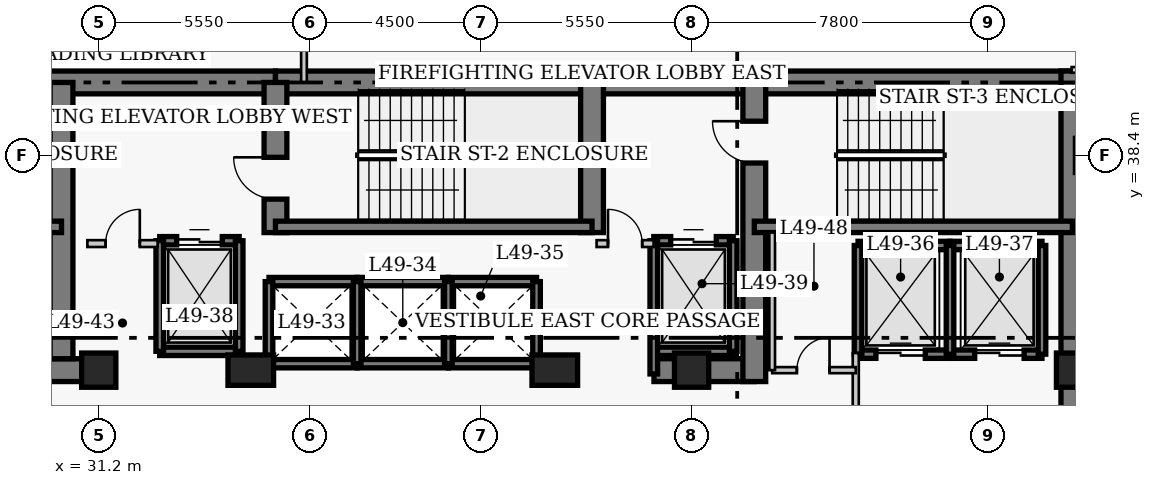
"""IFC4 building model, lengths in metres.
Left out: names, types, materials, properties, quantities, classifications, styles, units other than length and angle.
Written with IfcOpenShell. Run it as: python <this file> out.ifc"""

import sys

from ifc_helpers import new_model, si_unit, direction, frame, frame_2d, origin, origin_2d, place, context, subcontext, project, spatial, rectangle, extrude, element, fill, save


model = new_model("IFC4")
c1 = context("Model", 3, precision=1e-05, world=origin(), true_north=direction((0.0, 1.0)))
c2 = subcontext(c1, "Body", "Model", "MODEL_VIEW")
j1 = project(units=[si_unit("LENGTHUNIT", "METRE"), si_unit("PLANEANGLEUNIT", "RADIAN")], contexts=[c1])
p1 = place(None, origin())
s1 = spatial("IfcSite", under=j1, at=p1, CompositionType="ELEMENT")
p2 = place(p1, origin())
s2 = spatial("IfcBuilding", under=s1, at=p2, CompositionType="ELEMENT")
p3 = place(p2, frame((0.0, 0.0, 196.8)))
s3 = spatial("IfcBuildingStorey", under=s2, at=p3, CompositionType="ELEMENT", Elevation=196.8)
p4 = place(p3, frame((21.6, 40.32, 0.0), z_axis=(0.0, 0.0, 1.0), x_axis=(1.0, 0.0, 0.0)))
e1 = element("IfcWall", 1, at=p4, inside=s3, PredefinedType="SHEAR", context=c2, shape_type="SweptSolid", body=[
    extrude(rectangle(XDim=14.25, YDim=0.6, at=frame_2d((7.125, 0.0))), origin(), (0.0, 0.0, 1.0), 3.9),
])
p5 = place(p3, frame((35.85, 40.32, 0.0), z_axis=(0.0, 0.0, 1.0), x_axis=(1.0, 0.0, 0.0)))
e2 = element("IfcWall", 2, at=p5, inside=s3, PredefinedType="SHEAR", context=c2, shape_type="SweptSolid", body=[
    extrude(rectangle(XDim=12.6, YDim=0.6, at=frame_2d((6.3, 0.0))), origin(), (0.0, 0.0, 1.0), 3.9),
])
p6 = place(p3, frame((48.45, 40.32, 0.0), z_axis=(0.0, 0.0, 1.0), x_axis=(1.0, 0.0, 0.0)))
e3 = element("IfcWall", 3, at=p6, inside=s3, PredefinedType="SHEAR", context=c2, shape_type="SweptSolid", body=[
    extrude(rectangle(XDim=8.67, YDim=0.6, at=frame_2d((4.335, 0.0))), origin(), (0.0, 0.0, 1.0), 3.9),
])
p7 = place(p3, frame((56.82, 27.05, 0.0), z_axis=(0.0, 0.0, 1.0), x_axis=(0.0, 1.0, 0.0)))
e4 = element("IfcWall", 4, at=p7, inside=s3, PredefinedType="SHEAR", context=c2, shape_type="SweptSolid", body=[
    extrude(rectangle(XDim=13.57, YDim=0.6, at=frame_2d((6.785, 0.0))), origin(), (0.0, 0.0, 1.0), 3.9),
])
p8 = place(p3, frame((28.45, 32.75, 0.0), z_axis=(0.0, 0.0, 1.0), x_axis=(1.0, 0.0, 0.0)))
e5 = element("IfcWall", 5, at=p8, inside=s3, PredefinedType="SHEAR", context=c2, shape_type="SweptSolid", body=[
    extrude(rectangle(XDim=2.4, YDim=0.6, at=frame_2d((1.2, 0.0))), origin(), (0.0, 0.0, 1.0), 3.9),
])
p9 = place(p3, frame((45.81, 32.75, 0.0), z_axis=(0.0, 0.0, 1.0), x_axis=(1.0, 0.0, 0.0)))
e6 = element("IfcWall", 6, at=p9, inside=s3, PredefinedType="SHEAR", context=c2, shape_type="SweptSolid", body=[
    extrude(rectangle(XDim=2.64, YDim=0.6, at=frame_2d((1.32, 0.0))), origin(), (0.0, 0.0, 1.0), 3.9),
])
p10 = place(p3, frame((30.22, 33.05, 0.0), z_axis=(0.0, 0.0, 1.0), x_axis=(0.0, 1.0, 0.0)))
e7 = element("IfcWall", 7, at=p10, inside=s3, PredefinedType="SHEAR", context=c2, shape_type="SweptSolid", body=[
    extrude(rectangle(XDim=7.27, YDim=0.6, at=frame_2d((3.635, 0.0))), origin(), (0.0, 0.0, 1.0), 3.9),
])
p11 = place(p3, frame((35.85, 36.37, 0.0), z_axis=(0.0, 0.0, 1.0), x_axis=(0.0, 1.0, 0.0)))
e8 = element("IfcWall", 8, at=p11, inside=s3, PredefinedType="SHEAR", context=c2, shape_type="SweptSolid", body=[
    extrude(rectangle(XDim=3.95, YDim=0.6, at=frame_2d((1.975, 0.0))), origin(), (0.0, 0.0, 1.0), 3.9),
])
p12 = place(p11, frame((0.88, 0.0, 0.0)))
e9 = element("IfcOpeningElement", 9, at=p12, cuts=e8, PredefinedType="OPENING", context=c2, shape_type="SweptSolid", body=[
    extrude(rectangle(XDim=1.1, YDim=2.15, at=frame_2d((0.55, 1.075))), frame((0.0, 0.31, 0.0), z_axis=(0.0, -1.0, 0.0), x_axis=(1.0, 0.0, 0.0)), (0.0, 0.0, 1.0), 0.62),
])
p13 = place(p3, frame((44.18, 36.37, 0.0), z_axis=(0.0, 0.0, 1.0), x_axis=(0.0, 1.0, 0.0)))
e10 = element("IfcWall", 10, at=p13, inside=s3, PredefinedType="SHEAR", context=c2, shape_type="SweptSolid", body=[
    extrude(rectangle(XDim=3.95, YDim=0.6, at=frame_2d((1.975, 0.0))), origin(), (0.0, 0.0, 1.0), 3.9),
])
p14 = place(p3, frame((48.45, 32.45, 0.0), z_axis=(0.0, 0.0, 1.0), x_axis=(0.0, 1.0, 0.0)))
e11 = element("IfcWall", 11, at=p14, inside=s3, PredefinedType="SHEAR", context=c2, shape_type="SweptSolid", body=[
    extrude(rectangle(XDim=7.87, YDim=0.6, at=frame_2d((3.935, 0.0))), origin(), (0.0, 0.0, 1.0), 3.9),
])
p15 = place(p14, frame((5.75, 0.0, 0.0)))
e12 = element("IfcOpeningElement", 12, at=p15, cuts=e11, PredefinedType="OPENING", context=c2, shape_type="SweptSolid", body=[
    extrude(rectangle(XDim=1.1, YDim=2.15, at=frame_2d((0.55, 1.075))), frame((0.0, 0.31, 0.0), z_axis=(0.0, -1.0, 0.0), x_axis=(1.0, 0.0, 0.0)), (0.0, 0.0, 1.0), 0.62),
])
p16 = place(p3, frame((21.9, 36.52, 0.0), z_axis=(0.0, 0.0, 1.0), x_axis=(1.0, 0.0, 0.0)))
e13 = element("IfcWall", 13, at=p16, inside=s3, PredefinedType="SHEAR", context=c2, shape_type="SweptSolid", body=[
    extrude(rectangle(XDim=8.32, YDim=0.3, at=frame_2d((4.16, 0.0))), origin(), (0.0, 0.0, 1.0), 3.9),
])
p17 = place(p16, frame((0.9, 0.0, 0.0)))
e14 = element("IfcOpeningElement", 14, at=p17, cuts=e13, PredefinedType="OPENING", context=c2, shape_type="SweptSolid", body=[
    extrude(rectangle(XDim=1.1, YDim=2.15, at=frame_2d((0.55, 1.075))), frame((0.0, 0.16, 0.0), z_axis=(0.0, -1.0, 0.0), x_axis=(1.0, 0.0, 0.0)), (0.0, 0.0, 1.0), 0.32),
])
p18 = place(p3, frame((35.85, 36.52, 0.0), z_axis=(0.0, 0.0, 1.0), x_axis=(1.0, 0.0, 0.0)))
e15 = element("IfcWall", 15, at=p18, inside=s3, PredefinedType="SHEAR", context=c2, shape_type="SweptSolid", body=[
    extrude(rectangle(XDim=8.33, YDim=0.3, at=frame_2d((4.165, 0.0))), origin(), (0.0, 0.0, 1.0), 3.9),
])
p19 = place(p3, frame((48.45, 36.52, 0.0), z_axis=(0.0, 0.0, 1.0), x_axis=(1.0, 0.0, 0.0)))
e16 = element("IfcWall", 16, at=p19, inside=s3, PredefinedType="SHEAR", context=c2, shape_type="SweptSolid", body=[
    extrude(rectangle(XDim=8.37, YDim=0.3, at=frame_2d((4.185, 0.0))), origin(), (0.0, 0.0, 1.0), 3.9),
])
p20 = place(p3, frame((31.2, 32.75, 0.0), z_axis=(0.0, 0.0, 1.0), x_axis=(1.0, 0.0, 0.0)))
e17 = element("IfcColumn", 17, at=p20, inside=s3, PredefinedType="COLUMN", context=c2, shape_type="SweptSolid", body=[
    extrude(rectangle(XDim=0.9, YDim=0.9, at=origin_2d()), origin(), (0.0, 0.0, 1.0), 3.9),
])
for number, where, z_axis, x_axis in (
    (18, (35.2, 32.75, 0.0), (0.0, 0.0, 1.0), (1.0, 0.0, 0.0)),
    (19, (43.2, 32.75, 0.0), (0.0, 0.0, 1.0), (1.0, 0.0, 0.0)),
):
    element("IfcColumn", number, at=place(p3, frame(where, z_axis=z_axis, x_axis=x_axis)), inside=s3, PredefinedType="COLUMN", context=c2, shape_type="SweptSolid", body=[
        extrude(rectangle(XDim=1.2, YDim=0.8, at=origin_2d()), origin(), (0.0, 0.0, 1.0), 3.9),
    ])
for number, where, z_axis, x_axis in (
    (20, (46.8, 32.75, 0.0), (0.0, 0.0, 1.0), (1.0, 0.0, 0.0)),
    (21, (56.85, 32.75, 0.0), (0.0, 0.0, 1.0), (1.0, 0.0, 0.0)),
):
    element("IfcColumn", number, at=place(p3, frame(where, z_axis=z_axis, x_axis=x_axis)), inside=s3, PredefinedType="COLUMN", context=c2, shape_type="SweptSolid", body=[
        extrude(rectangle(XDim=0.9, YDim=0.9, at=origin_2d()), origin(), (0.0, 0.0, 1.0), 3.9),
    ])
for number, where, z_axis, x_axis in (
    (22, (35.68, 35.08, 0.0), (0.0, 0.0, 1.0), (1.0, 0.0, 0.0)),
    (23, (35.68, 32.92, 0.0), (0.0, 0.0, 1.0), (1.0, 0.0, 0.0)),
):
    element("IfcWall", number, at=place(p3, frame(where, z_axis=z_axis, x_axis=x_axis)), inside=s3, PredefinedType="SHEAR", context=c2, shape_type="SweptSolid", body=[
        extrude(rectangle(XDim=2.32, YDim=0.22, at=frame_2d((1.16, 0.0))), origin(), (0.0, 0.0, 1.0), 3.9),
    ])
p21 = place(p3, frame((35.68, 32.92, 0.0), z_axis=(0.0, 0.0, 1.0), x_axis=(0.0, 1.0, 0.0)))
e24 = element("IfcWall", 24, at=p21, inside=s3, PredefinedType="SHEAR", context=c2, shape_type="SweptSolid", body=[
    extrude(rectangle(XDim=2.16, YDim=0.2, at=frame_2d((1.08, 0.0))), origin(), (0.0, 0.0, 1.0), 3.9),
])
for number, where, z_axis, x_axis in (
    (25, (38.0, 35.08, 0.0), (0.0, 0.0, 1.0), (1.0, 0.0, 0.0)),
    (26, (38.0, 32.92, 0.0), (0.0, 0.0, 1.0), (1.0, 0.0, 0.0)),
):
    element("IfcWall", number, at=place(p3, frame(where, z_axis=z_axis, x_axis=x_axis)), inside=s3, PredefinedType="SHEAR", context=c2, shape_type="SweptSolid", body=[
        extrude(rectangle(XDim=2.4, YDim=0.22, at=frame_2d((1.2, 0.0))), origin(), (0.0, 0.0, 1.0), 3.9),
    ])
p22 = place(p3, frame((38.0, 32.92, 0.0), z_axis=(0.0, 0.0, 1.0), x_axis=(0.0, 1.0, 0.0)))
e27 = element("IfcWall", 27, at=p22, inside=s3, PredefinedType="SHEAR", context=c2, shape_type="SweptSolid", body=[
    extrude(rectangle(XDim=2.16, YDim=0.2, at=frame_2d((1.08, 0.0))), origin(), (0.0, 0.0, 1.0), 3.9),
])
for number, where, z_axis, x_axis in (
    (28, (40.4, 35.08, 0.0), (0.0, 0.0, 1.0), (1.0, 0.0, 0.0)),
    (29, (40.4, 32.92, 0.0), (0.0, 0.0, 1.0), (1.0, 0.0, 0.0)),
):
    element("IfcWall", number, at=place(p3, frame(where, z_axis=z_axis, x_axis=x_axis)), inside=s3, PredefinedType="SHEAR", context=c2, shape_type="SweptSolid", body=[
        extrude(rectangle(XDim=2.32, YDim=0.22, at=frame_2d((1.16, 0.0))), origin(), (0.0, 0.0, 1.0), 3.9),
    ])
for number, where, z_axis, x_axis in (
    (30, (40.4, 32.92, 0.0), (0.0, 0.0, 1.0), (0.0, 1.0, 0.0)),
    (31, (42.72, 32.92, 0.0), (0.0, 0.0, 1.0), (0.0, 1.0, 0.0)),
):
    element("IfcWall", number, at=place(p3, frame(where, z_axis=z_axis, x_axis=x_axis)), inside=s3, PredefinedType="SHEAR", context=c2, shape_type="SweptSolid", body=[
        extrude(rectangle(XDim=2.16, YDim=0.2, at=frame_2d((1.08, 0.0))), origin(), (0.0, 0.0, 1.0), 3.9),
    ])
p23 = place(p3, frame((51.18, 36.03, 0.0), z_axis=(0.0, 0.0, 1.0), x_axis=(1.0, 0.0, 0.0)))
e32 = element("IfcWall", 32, at=p23, inside=s3, PredefinedType="SHEAR", context=c2, shape_type="SweptSolid", body=[
    extrude(rectangle(XDim=2.42, YDim=0.22, at=frame_2d((1.21, 0.0))), origin(), (0.0, 0.0, 1.0), 3.9),
])
p24 = place(p3, frame((51.18, 33.17, 0.0), z_axis=(0.0, 0.0, 1.0), x_axis=(1.0, 0.0, 0.0)))
e33 = element("IfcWall", 33, at=p24, inside=s3, PredefinedType="SHEAR", context=c2, shape_type="SweptSolid", body=[
    extrude(rectangle(XDim=2.42, YDim=0.22, at=frame_2d((1.21, 0.0))), origin(), (0.0, 0.0, 1.0), 3.9),
])
p25 = place(p24, frame((0.47, 0.0, 0.0)))
e34 = element("IfcOpeningElement", 34, at=p25, cuts=e33, PredefinedType="OPENING", context=c2, shape_type="SweptSolid", body=[
    extrude(rectangle(XDim=1.3, YDim=2.15, at=frame_2d((0.65, 1.075))), frame((0.0, 0.12, 0.0), z_axis=(0.0, -1.0, 0.0), x_axis=(1.0, 0.0, 0.0)), (0.0, 0.0, 1.0), 0.24),
])
p26 = place(p3, frame((51.18, 33.17, 0.0), z_axis=(0.0, 0.0, 1.0), x_axis=(0.0, 1.0, 0.0)))
e35 = element("IfcWall", 35, at=p26, inside=s3, PredefinedType="SHEAR", context=c2, shape_type="SweptSolid", body=[
    extrude(rectangle(XDim=2.86, YDim=0.2, at=frame_2d((1.43, 0.0))), origin(), (0.0, 0.0, 1.0), 3.9),
])
p27 = place(p3, frame((53.6, 36.03, 0.0), z_axis=(0.0, 0.0, 1.0), x_axis=(1.0, 0.0, 0.0)))
e36 = element("IfcWall", 36, at=p27, inside=s3, PredefinedType="SHEAR", context=c2, shape_type="SweptSolid", body=[
    extrude(rectangle(XDim=2.42, YDim=0.22, at=frame_2d((1.21, 0.0))), origin(), (0.0, 0.0, 1.0), 3.9),
])
p28 = place(p3, frame((53.6, 33.17, 0.0), z_axis=(0.0, 0.0, 1.0), x_axis=(1.0, 0.0, 0.0)))
e37 = element("IfcWall", 37, at=p28, inside=s3, PredefinedType="SHEAR", context=c2, shape_type="SweptSolid", body=[
    extrude(rectangle(XDim=2.42, YDim=0.22, at=frame_2d((1.21, 0.0))), origin(), (0.0, 0.0, 1.0), 3.9),
])
p29 = place(p28, frame((0.65, 0.0, 0.0)))
e38 = element("IfcOpeningElement", 38, at=p29, cuts=e37, PredefinedType="OPENING", context=c2, shape_type="SweptSolid", body=[
    extrude(rectangle(XDim=1.3, YDim=2.15, at=frame_2d((0.65, 1.075))), frame((0.0, 0.12, 0.0), z_axis=(0.0, -1.0, 0.0), x_axis=(1.0, 0.0, 0.0)), (0.0, 0.0, 1.0), 0.24),
])
for number, where, z_axis, x_axis in (
    (39, (53.6, 33.17, 0.0), (0.0, 0.0, 1.0), (0.0, 1.0, 0.0)),
    (40, (56.02, 33.17, 0.0), (0.0, 0.0, 1.0), (0.0, 1.0, 0.0)),
):
    element("IfcWall", number, at=place(p3, frame(where, z_axis=z_axis, x_axis=x_axis)), inside=s3, PredefinedType="SHEAR", context=c2, shape_type="SweptSolid", body=[
        extrude(rectangle(XDim=2.86, YDim=0.2, at=frame_2d((1.43, 0.0))), origin(), (0.0, 0.0, 1.0), 3.9),
    ])
p30 = place(p3, frame((32.805, 36.155, 0.0), z_axis=(0.0, 0.0, 1.0), x_axis=(1.0, 0.0, 0.0)))
e41 = element("IfcWall", 41, at=p30, inside=s3, PredefinedType="SHEAR", context=c2, shape_type="SweptSolid", body=[
    extrude(rectangle(XDim=2.09, YDim=0.22, at=frame_2d((1.045, 0.0))), origin(), (0.0, 0.0, 1.0), 3.9),
])
p31 = place(p30, frame((0.445, 0.0, 0.0)))
e42 = element("IfcOpeningElement", 42, at=p31, cuts=e41, PredefinedType="OPENING", context=c2, shape_type="SweptSolid", body=[
    extrude(rectangle(XDim=1.2, YDim=2.15, at=frame_2d((0.6, 1.075))), frame((0.0, 0.12, 0.0), z_axis=(0.0, -1.0, 0.0), x_axis=(1.0, 0.0, 0.0)), (0.0, 0.0, 1.0), 0.24),
])
p32 = place(p3, frame((32.805, 33.245, 0.0), z_axis=(0.0, 0.0, 1.0), x_axis=(1.0, 0.0, 0.0)))
e43 = element("IfcWall", 43, at=p32, inside=s3, PredefinedType="SHEAR", context=c2, shape_type="SweptSolid", body=[
    extrude(rectangle(XDim=2.09, YDim=0.22, at=frame_2d((1.045, 0.0))), origin(), (0.0, 0.0, 1.0), 3.9),
])
for number, where, z_axis, x_axis in (
    (44, (32.805, 33.245, 0.0), (0.0, 0.0, 1.0), (0.0, 1.0, 0.0)),
    (45, (34.895, 33.245, 0.0), (0.0, 0.0, 1.0), (0.0, 1.0, 0.0)),
):
    element("IfcWall", number, at=place(p3, frame(where, z_axis=z_axis, x_axis=x_axis)), inside=s3, PredefinedType="SHEAR", context=c2, shape_type="SweptSolid", body=[
        extrude(rectangle(XDim=2.91, YDim=0.2, at=frame_2d((1.455, 0.0))), origin(), (0.0, 0.0, 1.0), 3.9),
    ])
p33 = place(p3, frame((45.805, 36.155, 0.0), z_axis=(0.0, 0.0, 1.0), x_axis=(1.0, 0.0, 0.0)))
e46 = element("IfcWall", 46, at=p33, inside=s3, PredefinedType="SHEAR", context=c2, shape_type="SweptSolid", body=[
    extrude(rectangle(XDim=2.09, YDim=0.22, at=frame_2d((1.045, 0.0))), origin(), (0.0, 0.0, 1.0), 3.9),
])
p34 = place(p33, frame((0.445, 0.0, 0.0)))
e47 = element("IfcOpeningElement", 47, at=p34, cuts=e46, PredefinedType="OPENING", context=c2, shape_type="SweptSolid", body=[
    extrude(rectangle(XDim=1.2, YDim=2.15, at=frame_2d((0.6, 1.075))), frame((0.0, 0.12, 0.0), z_axis=(0.0, -1.0, 0.0), x_axis=(1.0, 0.0, 0.0)), (0.0, 0.0, 1.0), 0.24),
])
p35 = place(p3, frame((45.805, 33.245, 0.0), z_axis=(0.0, 0.0, 1.0), x_axis=(1.0, 0.0, 0.0)))
e48 = element("IfcWall", 48, at=p35, inside=s3, PredefinedType="SHEAR", context=c2, shape_type="SweptSolid", body=[
    extrude(rectangle(XDim=2.09, YDim=0.22, at=frame_2d((1.045, 0.0))), origin(), (0.0, 0.0, 1.0), 3.9),
])
p36 = place(p3, frame((45.805, 32.65, 0.0), z_axis=(0.0, 0.0, 1.0), x_axis=(0.0, 1.0, 0.0)))
e49 = element("IfcWall", 49, at=p36, inside=s3, PredefinedType="SHEAR", context=c2, shape_type="SweptSolid", body=[
    extrude(rectangle(XDim=3.505, YDim=0.2, at=frame_2d((1.752, 0.0))), origin(), (0.0, 0.0, 1.0), 3.9),
])
p37 = place(p3, frame((47.895, 33.245, 0.0), z_axis=(0.0, 0.0, 1.0), x_axis=(0.0, 1.0, 0.0)))
e50 = element("IfcWall", 50, at=p37, inside=s3, PredefinedType="SHEAR", context=c2, shape_type="SweptSolid", body=[
    extrude(rectangle(XDim=2.91, YDim=0.2, at=frame_2d((1.455, 0.0))), origin(), (0.0, 0.0, 1.0), 3.9),
])
p38 = place(p3, frame((30.9, 36.08, 0.0), z_axis=(0.0, 0.0, 1.0), x_axis=(1.0, 0.0, 0.0)))
e51 = element("IfcWall", 51, at=p38, inside=s3, PredefinedType="PARTITIONING", context=c2, shape_type="SweptSolid", body=[
    extrude(rectangle(XDim=1.85, YDim=0.18, at=frame_2d((0.925, 0.0))), origin(), (0.0, 0.0, 1.0), 3.65),
])
p39 = place(p38, frame((0.48, 0.0, 0.0)))
e52 = element("IfcOpeningElement", 52, at=p39, cuts=e51, PredefinedType="OPENING", context=c2, shape_type="SweptSolid", body=[
    extrude(rectangle(XDim=0.9, YDim=2.15, at=frame_2d((0.45, 1.075))), frame((0.0, 0.1, 0.0), z_axis=(0.0, -1.0, 0.0), x_axis=(1.0, 0.0, 0.0)), (0.0, 0.0, 1.0), 0.2),
])
p40 = place(p3, frame((44.3, 36.08, 0.0), z_axis=(0.0, 0.0, 1.0), x_axis=(1.0, 0.0, 0.0)))
e53 = element("IfcWall", 53, at=p40, inside=s3, PredefinedType="PARTITIONING", context=c2, shape_type="SweptSolid", body=[
    extrude(rectangle(XDim=1.5, YDim=0.18, at=frame_2d((0.75, 0.0))), origin(), (0.0, 0.0, 1.0), 3.65),
])
p41 = place(p40, frame((0.3, 0.0, 0.0)))
e54 = element("IfcOpeningElement", 54, at=p41, cuts=e53, PredefinedType="OPENING", context=c2, shape_type="SweptSolid", body=[
    extrude(rectangle(XDim=0.9, YDim=2.15, at=frame_2d((0.45, 1.075))), frame((0.0, 0.1, 0.0), z_axis=(0.0, -1.0, 0.0), x_axis=(1.0, 0.0, 0.0)), (0.0, 0.0, 1.0), 0.2),
])
p42 = place(p3, frame((51.12, 29.5, 0.0), z_axis=(0.0, 0.0, 1.0), x_axis=(0.0, 1.0, 0.0)))
e55 = element("IfcWall", 55, at=p42, inside=s3, PredefinedType="PARTITIONING", context=c2, shape_type="SweptSolid", body=[
    extrude(rectangle(XDim=3.7, YDim=0.16, at=frame_2d((1.85, 0.0))), origin(), (0.0, 0.0, 1.0), 3.65),
])
p43 = place(p42, frame((0.9, 0.0, 0.0)))
e56 = element("IfcOpeningElement", 56, at=p43, cuts=e55, PredefinedType="OPENING", context=c2, shape_type="SweptSolid", body=[
    extrude(rectangle(XDim=1.1, YDim=2.15, at=frame_2d((0.55, 1.075))), frame((0.0, 0.09, 0.0), z_axis=(0.0, -1.0, 0.0), x_axis=(1.0, 0.0, 0.0)), (0.0, 0.0, 1.0), 0.18),
])
p44 = place(p3, frame((48.92, 32.75, 0.0), z_axis=(0.0, 0.0, 1.0), x_axis=(1.0, 0.0, 0.0)))
e57 = element("IfcWall", 57, at=p44, inside=s3, PredefinedType="PARTITIONING", context=c2, shape_type="SweptSolid", body=[
    extrude(rectangle(XDim=2.2, YDim=0.16, at=frame_2d((1.1, 0.0))), origin(), (0.0, 0.0, 1.0), 3.65),
])
p45 = place(p44, frame((0.65, 0.0, 0.0)))
e58 = element("IfcOpeningElement", 58, at=p45, cuts=e57, PredefinedType="OPENING", context=c2, shape_type="SweptSolid", body=[
    extrude(rectangle(XDim=0.86, YDim=2.05, at=frame_2d((0.43, 1.025))), frame((0.0, 0.09, 0.0), z_axis=(0.0, -1.0, 0.0), x_axis=(1.0, 0.0, 0.0)), (0.0, 0.0, 1.0), 0.18),
])
p46 = place(p3, frame((48.92, 32.75, 0.0), z_axis=(0.0, 0.0, 1.0), x_axis=(0.0, 1.0, 0.0)))
e59 = element("IfcWall", 59, at=p46, inside=s3, PredefinedType="PARTITIONING", context=c2, shape_type="SweptSolid", body=[
    extrude(rectangle(XDim=3.62, YDim=0.15, at=frame_2d((1.81, 0.0))), origin(), (0.0, 0.0, 1.0), 3.65),
])
p47 = place(p3, frame((56.8, 40.65, 0.0), z_axis=(0.0, 0.0, 1.0), x_axis=(1.0, 0.0, 0.0)))
e60 = element("IfcWall", 60, at=p47, inside=s3, PredefinedType="PARTITIONING", context=c2, shape_type="SweptSolid", body=[
    extrude(rectangle(XDim=4.56, YDim=0.15, at=frame_2d((2.28, 0.0))), origin(), (0.0, 0.0, 1.0), 3.65),
])
p48 = place(p47, frame((2.95, 0.0, 0.0)))
e61 = element("IfcOpeningElement", 61, at=p48, cuts=e60, PredefinedType="OPENING", context=c2, shape_type="SweptSolid", body=[
    extrude(rectangle(XDim=1.0, YDim=2.15, at=frame_2d((0.5, 1.075))), frame((0.0, 0.085, 0.0), z_axis=(0.0, -1.0, 0.0), x_axis=(1.0, 0.0, 0.0)), (0.0, 0.0, 1.0), 0.17),
])
p49 = place(p3, frame((36.6, 40.32, 0.0), z_axis=(0.0, 0.0, 1.0), x_axis=(0.0, 1.0, 0.0)))
e62 = element("IfcWall", 62, at=p49, inside=s3, PredefinedType="PARTITIONING", context=c2, shape_type="SweptSolid", body=[
    extrude(rectangle(XDim=2.345, YDim=0.15, at=frame_2d((1.172, 0.0))), origin(), (0.0, 0.0, 1.0), 3.65),
])
p50 = place(p25, origin())
e63 = element("IfcDoor", 63, at=p50, inside=s3, OperationType="DOUBLE_DOOR_SLIDING", PredefinedType="DOOR", context=c2, shape_type="SweptSolid", body=[
    extrude(rectangle(XDim=1.3, YDim=2.15, at=frame_2d((0.65, 1.075))), frame((0.0, 0.025, 0.0), z_axis=(0.0, -1.0, 0.0), x_axis=(1.0, 0.0, 0.0)), (0.0, 0.0, 1.0), 0.05),
])
fill(e34, e63)
p51 = place(p29, origin())
e64 = element("IfcDoor", 64, at=p51, inside=s3, OperationType="DOUBLE_DOOR_SLIDING", PredefinedType="DOOR", context=c2, shape_type="SweptSolid", body=[
    extrude(rectangle(XDim=1.3, YDim=2.15, at=frame_2d((0.65, 1.075))), frame((0.0, 0.025, 0.0), z_axis=(0.0, -1.0, 0.0), x_axis=(1.0, 0.0, 0.0)), (0.0, 0.0, 1.0), 0.05),
])
fill(e38, e64)
p52 = place(p31, origin())
e65 = element("IfcDoor", 65, at=p52, inside=s3, OperationType="DOUBLE_DOOR_SLIDING", PredefinedType="DOOR", context=c2, shape_type="SweptSolid", body=[
    extrude(rectangle(XDim=1.2, YDim=2.15, at=frame_2d((0.6, 1.075))), frame((0.0, 0.025, 0.0), z_axis=(0.0, -1.0, 0.0), x_axis=(1.0, 0.0, 0.0)), (0.0, 0.0, 1.0), 0.05),
])
fill(e42, e65)
p53 = place(p34, origin())
e66 = element("IfcDoor", 66, at=p53, inside=s3, OperationType="DOUBLE_DOOR_SLIDING", PredefinedType="DOOR", context=c2, shape_type="SweptSolid", body=[
    extrude(rectangle(XDim=1.2, YDim=2.15, at=frame_2d((0.6, 1.075))), frame((0.0, 0.025, 0.0), z_axis=(0.0, -1.0, 0.0), x_axis=(1.0, 0.0, 0.0)), (0.0, 0.0, 1.0), 0.05),
])
fill(e47, e66)
p54 = place(p39, origin())
e67 = element("IfcDoor", 67, at=p54, inside=s3, OperationType="SINGLE_SWING_RIGHT", PredefinedType="DOOR", context=c2, shape_type="SweptSolid", body=[
    extrude(rectangle(XDim=0.9, YDim=2.15, at=frame_2d((0.45, 1.075))), frame((0.0, 0.025, 0.0), z_axis=(0.0, -1.0, 0.0), x_axis=(1.0, 0.0, 0.0)), (0.0, 0.0, 1.0), 0.05),
])
fill(e52, e67)
p55 = place(p41, origin())
e68 = element("IfcDoor", 68, at=p55, inside=s3, OperationType="SINGLE_SWING_LEFT", PredefinedType="DOOR", context=c2, shape_type="SweptSolid", body=[
    extrude(rectangle(XDim=0.9, YDim=2.15, at=frame_2d((0.45, 1.075))), frame((0.0, 0.025, 0.0), z_axis=(0.0, -1.0, 0.0), x_axis=(1.0, 0.0, 0.0)), (0.0, 0.0, 1.0), 0.05),
])
fill(e54, e68)
p56 = place(p45, origin())
e69 = element("IfcDoor", 69, at=p56, inside=s3, OperationType="SINGLE_SWING_RIGHT", PredefinedType="DOOR", context=c2, shape_type="SweptSolid", body=[
    extrude(rectangle(XDim=0.86, YDim=2.05, at=frame_2d((0.43, 1.025))), frame((0.0, 0.025, 0.0), z_axis=(0.0, -1.0, 0.0), x_axis=(1.0, 0.0, 0.0)), (0.0, 0.0, 1.0), 0.05),
])
fill(e58, e69)
p57 = place(p12, origin())
e70 = element("IfcDoor", 70, at=p57, inside=s3, OperationType="SINGLE_SWING_RIGHT", PredefinedType="DOOR", context=c2, shape_type="SweptSolid", body=[
    extrude(rectangle(XDim=1.1, YDim=2.15, at=frame_2d((0.55, 1.075))), frame((0.0, 0.025, 0.0), z_axis=(0.0, -1.0, 0.0), x_axis=(1.0, 0.0, 0.0)), (0.0, 0.0, 1.0), 0.05),
])
fill(e9, e70)
p58 = place(p15, origin())
e71 = element("IfcDoor", 71, at=p58, inside=s3, OperationType="SINGLE_SWING_RIGHT", PredefinedType="DOOR", context=c2, shape_type="SweptSolid", body=[
    extrude(rectangle(XDim=1.1, YDim=2.15, at=frame_2d((0.55, 1.075))), frame((0.0, 0.025, 0.0), z_axis=(0.0, -1.0, 0.0), x_axis=(1.0, 0.0, 0.0)), (0.0, 0.0, 1.0), 0.05),
])
fill(e12, e71)
save(model, sys.argv[1])
